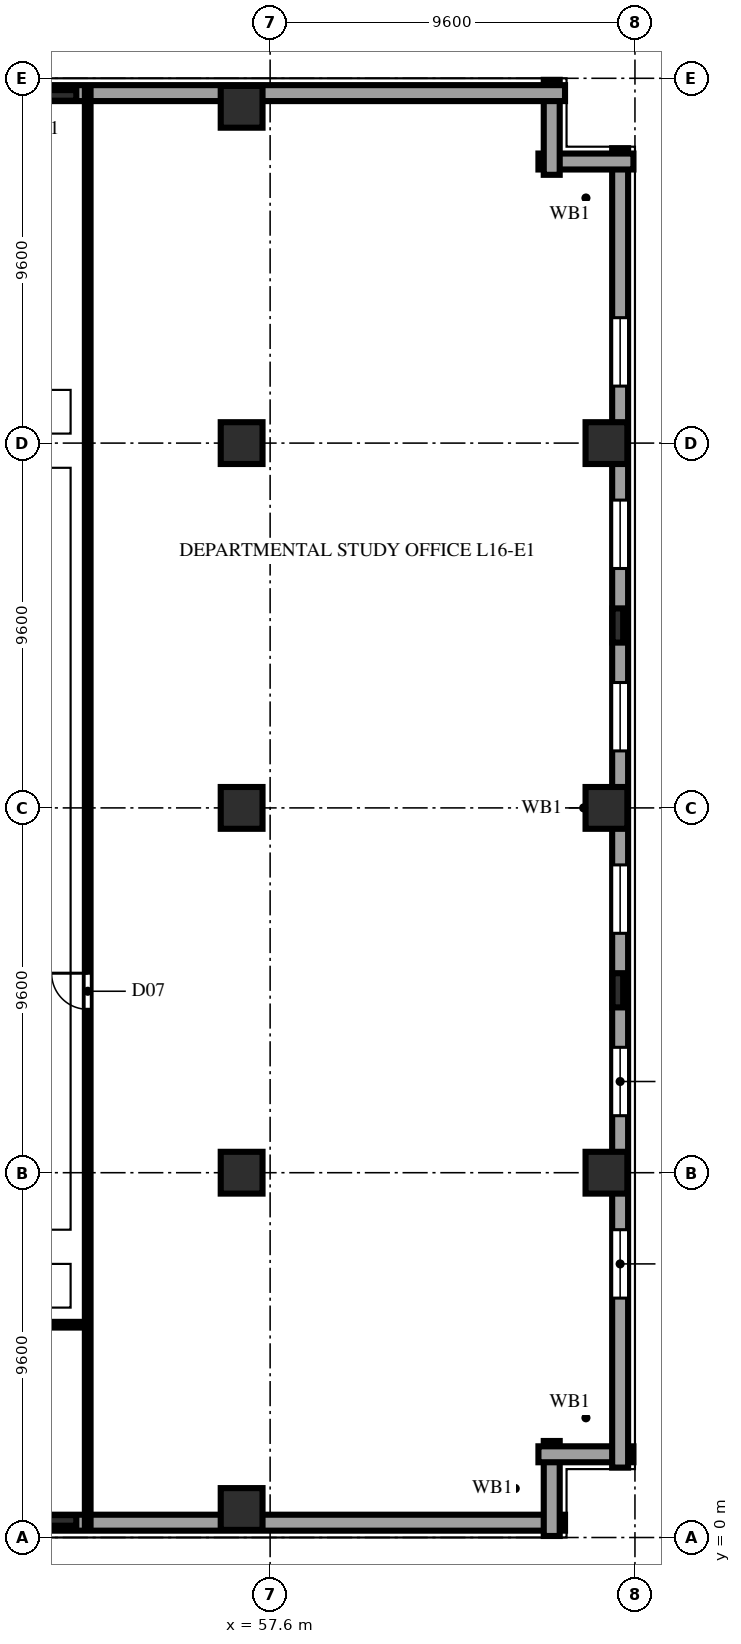
"""IFC4 building model, lengths in metres.
Left out: names, types, materials, properties, quantities, classifications, styles, units other than length and angle.
Written with IfcOpenShell. Run it as: python <this file> out.ifc"""

import sys

from ifc_helpers import new_model, si_unit, direction, frame, frame_2d, origin, origin_2d, place, context, subcontext, project, spatial, rectangle, extrude, element, fill, save


model = new_model("IFC4")
c1 = context("Model", 3, precision=1e-05, world=origin(), true_north=direction((0.0, 1.0)))
c2 = subcontext(c1, "Body", "Model", "MODEL_VIEW")
j1 = project(units=[si_unit("LENGTHUNIT", "METRE"), si_unit("PLANEANGLEUNIT", "RADIAN")], contexts=[c1])
p1 = place(None, origin())
s1 = spatial("IfcSite", under=j1, at=p1, CompositionType="ELEMENT")
p2 = place(p1, origin())
s2 = spatial("IfcBuilding", under=s1, at=p2, CompositionType="ELEMENT")
p3 = place(p2, frame((0.0, 0.0, 66.0)))
s3 = spatial("IfcBuildingStorey", under=s2, at=p3, CompositionType="ELEMENT", Elevation=66.0)
for number, where, z_axis, x_axis in (
    (1, (56.85, 0.75, 0.0), (0.0, 0.0, 1.0), (1.0, 0.0, 0.0)),
    (2, (56.85, 9.6, 0.0), (0.0, 0.0, 1.0), (1.0, 0.0, 0.0)),
    (3, (56.85, 19.2, 0.0), (0.0, 0.0, 1.0), (1.0, 0.0, 0.0)),
    (4, (56.85, 28.8, 0.0), (0.0, 0.0, 1.0), (1.0, 0.0, 0.0)),
    (5, (56.85, 37.65, 0.0), (0.0, 0.0, 1.0), (1.0, 0.0, 0.0)),
    (6, (66.45, 9.6, 0.0), (0.0, 0.0, 1.0), (1.0, 0.0, 0.0)),
    (7, (66.45, 19.2, 0.0), (0.0, 0.0, 1.0), (1.0, 0.0, 0.0)),
    (8, (66.45, 28.8, 0.0), (0.0, 0.0, 1.0), (1.0, 0.0, 0.0)),
):
    element("IfcColumn", number, at=place(p3, frame(where, z_axis=z_axis, x_axis=x_axis)), inside=s3, PredefinedType="COLUMN", context=c2, shape_type="SweptSolid", body=[
        extrude(rectangle(XDim=1.1, YDim=1.1, at=origin_2d()), origin(), (0.0, 0.0, 1.0), 3.8),
    ])
for number, where, z_axis, x_axis in (
    (9, (52.05, 0.45, 0.0), (0.0, 0.0, 1.0), (1.0, 0.0, 0.0)),
    (10, (66.75, 14.4, 0.0), (0.0, 0.0, 1.0), (0.0, 1.0, 0.0)),
    (11, (66.75, 24.0, 0.0), (0.0, 0.0, 1.0), (0.0, 1.0, 0.0)),
    (12, (52.05, 37.95, 0.0), (0.0, 0.0, 1.0), (1.0, 0.0, 0.0)),
):
    element("IfcColumn", number, at=place(p3, frame(where, z_axis=z_axis, x_axis=x_axis)), inside=s3, PredefinedType="PILASTER", context=c2, shape_type="SweptSolid", body=[
        extrude(rectangle(XDim=0.9, YDim=0.28, at=origin_2d()), origin(), (0.0, 0.0, 1.0), 3.8),
    ])
p4 = place(p3, frame((1.84, 0.39, 0.0), z_axis=(0.0, 0.0, 1.0), x_axis=(1.0, 0.0, 0.0)))
e13 = element("IfcWall", 13, at=p4, inside=s3, PredefinedType="SOLIDWALL", context=c2, shape_type="SweptSolid", body=[
    extrude(rectangle(XDim=63.52, YDim=0.42, at=frame_2d((31.76, 0.0))), origin(), (0.0, 0.0, 1.0), 3.54),
])
p5 = place(p4, frame((4.16, 0.0, 0.85)))
e14 = element("IfcOpeningElement", 14, at=p5, cuts=e13, PredefinedType="OPENING", context=c2, shape_type="SweptSolid", body=[
    extrude(rectangle(XDim=2.4, YDim=1.85, at=frame_2d((1.2, 0.925))), frame((0.0, 0.222, 0.0), z_axis=(0.0, -1.0, 0.0), x_axis=(1.0, 0.0, 0.0)), (0.0, 0.0, 1.0), 0.444),
])
p6 = place(p4, frame((8.96, 0.0, 0.85)))
e15 = element("IfcOpeningElement", 15, at=p6, cuts=e13, PredefinedType="OPENING", context=c2, shape_type="SweptSolid", body=[
    extrude(rectangle(XDim=2.4, YDim=1.85, at=frame_2d((1.2, 0.925))), frame((0.0, 0.222, 0.0), z_axis=(0.0, -1.0, 0.0), x_axis=(1.0, 0.0, 0.0)), (0.0, 0.0, 1.0), 0.444),
])
p7 = place(p4, frame((13.76, 0.0, 0.85)))
e16 = element("IfcOpeningElement", 16, at=p7, cuts=e13, PredefinedType="OPENING", context=c2, shape_type="SweptSolid", body=[
    extrude(rectangle(XDim=2.4, YDim=1.85, at=frame_2d((1.2, 0.925))), frame((0.0, 0.222, 0.0), z_axis=(0.0, -1.0, 0.0), x_axis=(1.0, 0.0, 0.0)), (0.0, 0.0, 1.0), 0.444),
])
p8 = place(p4, frame((18.56, 0.0, 0.85)))
e17 = element("IfcOpeningElement", 17, at=p8, cuts=e13, PredefinedType="OPENING", context=c2, shape_type="SweptSolid", body=[
    extrude(rectangle(XDim=2.4, YDim=1.85, at=frame_2d((1.2, 0.925))), frame((0.0, 0.222, 0.0), z_axis=(0.0, -1.0, 0.0), x_axis=(1.0, 0.0, 0.0)), (0.0, 0.0, 1.0), 0.444),
])
p9 = place(p4, frame((23.36, 0.0, 0.85)))
e18 = element("IfcOpeningElement", 18, at=p9, cuts=e13, PredefinedType="OPENING", context=c2, shape_type="SweptSolid", body=[
    extrude(rectangle(XDim=2.4, YDim=1.85, at=frame_2d((1.2, 0.925))), frame((0.0, 0.222, 0.0), z_axis=(0.0, -1.0, 0.0), x_axis=(1.0, 0.0, 0.0)), (0.0, 0.0, 1.0), 0.444),
])
p10 = place(p4, frame((28.16, 0.0, 0.85)))
e19 = element("IfcOpeningElement", 19, at=p10, cuts=e13, PredefinedType="OPENING", context=c2, shape_type="SweptSolid", body=[
    extrude(rectangle(XDim=2.4, YDim=1.85, at=frame_2d((1.2, 0.925))), frame((0.0, 0.222, 0.0), z_axis=(0.0, -1.0, 0.0), x_axis=(1.0, 0.0, 0.0)), (0.0, 0.0, 1.0), 0.444),
])
for number, where, z_axis, x_axis in (
    (20, (65.01, 0.04, 0.0), (0.0, 0.0, 1.0), (0.0, 1.0, 0.0)),
    (21, (64.66, 2.19, 0.0), (0.0, 0.0, 1.0), (1.0, 0.0, 0.0)),
):
    element("IfcWall", number, at=place(p3, frame(where, z_axis=z_axis, x_axis=x_axis)), inside=s3, PredefinedType="SOLIDWALL", context=c2, shape_type="SweptSolid", body=[
        extrude(rectangle(XDim=2.5, YDim=0.42, at=frame_2d((1.25, 0.0))), origin(), (0.0, 0.0, 1.0), 3.54),
    ])
p11 = place(p3, frame((66.81, 1.84, 0.0), z_axis=(0.0, 0.0, 1.0), x_axis=(0.0, 1.0, 0.0)))
e22 = element("IfcWall", 22, at=p11, inside=s3, PredefinedType="SOLIDWALL", context=c2, shape_type="SweptSolid", body=[
    extrude(rectangle(XDim=34.72, YDim=0.42, at=frame_2d((17.36, 0.0))), origin(), (0.0, 0.0, 1.0), 3.54),
])
p12 = place(p11, frame((4.46, 0.0, 0.85)))
e23 = element("IfcOpeningElement", 23, at=p12, cuts=e22, PredefinedType="OPENING", context=c2, shape_type="SweptSolid", body=[
    extrude(rectangle(XDim=1.8, YDim=1.85, at=frame_2d((0.9, 0.925))), frame((0.0, 0.222, 0.0), z_axis=(0.0, -1.0, 0.0), x_axis=(1.0, 0.0, 0.0)), (0.0, 0.0, 1.0), 0.444),
])
p13 = place(p11, frame((9.26, 0.0, 0.85)))
e24 = element("IfcOpeningElement", 24, at=p13, cuts=e22, PredefinedType="OPENING", context=c2, shape_type="SweptSolid", body=[
    extrude(rectangle(XDim=1.8, YDim=1.85, at=frame_2d((0.9, 0.925))), frame((0.0, 0.222, 0.0), z_axis=(0.0, -1.0, 0.0), x_axis=(1.0, 0.0, 0.0)), (0.0, 0.0, 1.0), 0.444),
])
p14 = place(p11, frame((14.06, 0.0, 0.85)))
e25 = element("IfcOpeningElement", 25, at=p14, cuts=e22, PredefinedType="OPENING", context=c2, shape_type="SweptSolid", body=[
    extrude(rectangle(XDim=1.8, YDim=1.85, at=frame_2d((0.9, 0.925))), frame((0.0, 0.222, 0.0), z_axis=(0.0, -1.0, 0.0), x_axis=(1.0, 0.0, 0.0)), (0.0, 0.0, 1.0), 0.444),
])
p15 = place(p11, frame((18.86, 0.0, 0.85)))
e26 = element("IfcOpeningElement", 26, at=p15, cuts=e22, PredefinedType="OPENING", context=c2, shape_type="SweptSolid", body=[
    extrude(rectangle(XDim=1.8, YDim=1.85, at=frame_2d((0.9, 0.925))), frame((0.0, 0.222, 0.0), z_axis=(0.0, -1.0, 0.0), x_axis=(1.0, 0.0, 0.0)), (0.0, 0.0, 1.0), 0.444),
])
p16 = place(p11, frame((23.66, 0.0, 0.85)))
e27 = element("IfcOpeningElement", 27, at=p16, cuts=e22, PredefinedType="OPENING", context=c2, shape_type="SweptSolid", body=[
    extrude(rectangle(XDim=1.8, YDim=1.85, at=frame_2d((0.9, 0.925))), frame((0.0, 0.222, 0.0), z_axis=(0.0, -1.0, 0.0), x_axis=(1.0, 0.0, 0.0)), (0.0, 0.0, 1.0), 0.444),
])
p17 = place(p11, frame((28.46, 0.0, 0.85)))
e28 = element("IfcOpeningElement", 28, at=p17, cuts=e22, PredefinedType="OPENING", context=c2, shape_type="SweptSolid", body=[
    extrude(rectangle(XDim=1.8, YDim=1.85, at=frame_2d((0.9, 0.925))), frame((0.0, 0.222, 0.0), z_axis=(0.0, -1.0, 0.0), x_axis=(1.0, 0.0, 0.0)), (0.0, 0.0, 1.0), 0.444),
])
for number, where, z_axis, x_axis in (
    (29, (67.16, 36.21, 0.0), (0.0, 0.0, 1.0), (-1.0, 0.0, 0.0)),
    (30, (65.01, 35.86, 0.0), (0.0, 0.0, 1.0), (0.0, 1.0, 0.0)),
):
    element("IfcWall", number, at=place(p3, frame(where, z_axis=z_axis, x_axis=x_axis)), inside=s3, PredefinedType="SOLIDWALL", context=c2, shape_type="SweptSolid", body=[
        extrude(rectangle(XDim=2.5, YDim=0.42, at=frame_2d((1.25, 0.0))), origin(), (0.0, 0.0, 1.0), 3.54),
    ])
p18 = place(p3, frame((65.36, 38.01, 0.0), z_axis=(0.0, 0.0, 1.0), x_axis=(-1.0, 0.0, 0.0)))
e31 = element("IfcWall", 31, at=p18, inside=s3, PredefinedType="SOLIDWALL", context=c2, shape_type="SweptSolid", body=[
    extrude(rectangle(XDim=27.7, YDim=0.42, at=frame_2d((13.85, 0.0))), origin(), (0.0, 0.0, 1.0), 3.54),
])
p19 = place(p3, frame((0.22, 5.6, 0.0), z_axis=(0.0, 0.0, 1.0), x_axis=(1.0, 0.0, 0.0)))
e32 = element("IfcWall", 32, at=p19, inside=s3, PredefinedType="PARTITIONING", context=c2, shape_type="SweptSolid", body=[
    extrude(rectangle(XDim=52.58, YDim=0.15, at=frame_2d((26.29, 0.0))), origin(), (0.0, 0.0, 1.0), 3.54),
])
p20 = place(p19, frame((13.68, 0.0, 0.0)))
e33 = element("IfcOpeningElement", 33, at=p20, cuts=e32, PredefinedType="OPENING", context=c2, shape_type="SweptSolid", body=[
    extrude(rectangle(XDim=1.2, YDim=2.2, at=frame_2d((0.6, 1.1))), frame((0.0, 0.087, 0.0), z_axis=(0.0, -1.0, 0.0), x_axis=(1.0, 0.0, 0.0)), (0.0, 0.0, 1.0), 0.174),
])
p21 = place(p19, frame((32.33, 0.0, 0.0)))
e34 = element("IfcOpeningElement", 34, at=p21, cuts=e32, PredefinedType="OPENING", context=c2, shape_type="SweptSolid", body=[
    extrude(rectangle(XDim=1.2, YDim=2.2, at=frame_2d((0.6, 1.1))), frame((0.0, 0.087, 0.0), z_axis=(0.0, -1.0, 0.0), x_axis=(1.0, 0.0, 0.0)), (0.0, 0.0, 1.0), 0.174),
])
p22 = place(p19, frame((41.73, 0.0, 0.0)))
e35 = element("IfcOpeningElement", 35, at=p22, cuts=e32, PredefinedType="OPENING", context=c2, shape_type="SweptSolid", body=[
    extrude(rectangle(XDim=1.2, YDim=2.2, at=frame_2d((0.6, 1.1))), frame((0.0, 0.087, 0.0), z_axis=(0.0, -1.0, 0.0), x_axis=(1.0, 0.0, 0.0)), (0.0, 0.0, 1.0), 0.174),
])
p23 = place(p3, frame((52.8, 0.22, 0.0), z_axis=(0.0, 0.0, 1.0), x_axis=(0.0, 1.0, 0.0)))
e36 = element("IfcWall", 36, at=p23, inside=s3, PredefinedType="PARTITIONING", context=c2, shape_type="SweptSolid", body=[
    extrude(rectangle(XDim=37.96, YDim=0.15, at=frame_2d((18.98, 0.0))), origin(), (0.0, 0.0, 1.0), 3.54),
])
p24 = place(p23, frame((13.68, 0.0, 0.0)))
e37 = element("IfcOpeningElement", 37, at=p24, cuts=e36, PredefinedType="OPENING", context=c2, shape_type="SweptSolid", body=[
    extrude(rectangle(XDim=0.95, YDim=2.15, at=frame_2d((0.475, 1.075))), frame((0.0, 0.087, 0.0), z_axis=(0.0, -1.0, 0.0), x_axis=(1.0, 0.0, 0.0)), (0.0, 0.0, 1.0), 0.174),
])
p25 = place(p12, origin())
e38 = element("IfcWindow", 38, at=p25, inside=s3, PartitioningType="DOUBLE_PANEL_VERTICAL", PredefinedType="WINDOW", context=c2, shape_type="SweptSolid", body=[
    extrude(rectangle(XDim=1.8, YDim=1.85, at=frame_2d((0.9, 0.925))), frame((0.0, 0.11, 0.0), z_axis=(0.0, -1.0, 0.0), x_axis=(1.0, 0.0, 0.0)), (0.0, 0.0, 1.0), 0.06),
])
fill(e23, e38)
p26 = place(p13, origin())
e39 = element("IfcWindow", 39, at=p26, inside=s3, PartitioningType="DOUBLE_PANEL_VERTICAL", PredefinedType="WINDOW", context=c2, shape_type="SweptSolid", body=[
    extrude(rectangle(XDim=1.8, YDim=1.85, at=frame_2d((0.9, 0.925))), frame((0.0, 0.11, 0.0), z_axis=(0.0, -1.0, 0.0), x_axis=(1.0, 0.0, 0.0)), (0.0, 0.0, 1.0), 0.06),
])
fill(e24, e39)
p27 = place(p14, origin())
e40 = element("IfcWindow", 40, at=p27, inside=s3, PartitioningType="DOUBLE_PANEL_VERTICAL", PredefinedType="WINDOW", context=c2, shape_type="SweptSolid", body=[
    extrude(rectangle(XDim=1.8, YDim=1.85, at=frame_2d((0.9, 0.925))), frame((0.0, 0.11, 0.0), z_axis=(0.0, -1.0, 0.0), x_axis=(1.0, 0.0, 0.0)), (0.0, 0.0, 1.0), 0.06),
])
fill(e25, e40)
p28 = place(p15, origin())
e41 = element("IfcWindow", 41, at=p28, inside=s3, PartitioningType="DOUBLE_PANEL_VERTICAL", PredefinedType="WINDOW", context=c2, shape_type="SweptSolid", body=[
    extrude(rectangle(XDim=1.8, YDim=1.85, at=frame_2d((0.9, 0.925))), frame((0.0, 0.11, 0.0), z_axis=(0.0, -1.0, 0.0), x_axis=(1.0, 0.0, 0.0)), (0.0, 0.0, 1.0), 0.06),
])
fill(e26, e41)
p29 = place(p16, origin())
e42 = element("IfcWindow", 42, at=p29, inside=s3, PartitioningType="DOUBLE_PANEL_VERTICAL", PredefinedType="WINDOW", context=c2, shape_type="SweptSolid", body=[
    extrude(rectangle(XDim=1.8, YDim=1.85, at=frame_2d((0.9, 0.925))), frame((0.0, 0.11, 0.0), z_axis=(0.0, -1.0, 0.0), x_axis=(1.0, 0.0, 0.0)), (0.0, 0.0, 1.0), 0.06),
])
fill(e27, e42)
p30 = place(p17, origin())
e43 = element("IfcWindow", 43, at=p30, inside=s3, PartitioningType="DOUBLE_PANEL_VERTICAL", PredefinedType="WINDOW", context=c2, shape_type="SweptSolid", body=[
    extrude(rectangle(XDim=1.8, YDim=1.85, at=frame_2d((0.9, 0.925))), frame((0.0, 0.11, 0.0), z_axis=(0.0, -1.0, 0.0), x_axis=(1.0, 0.0, 0.0)), (0.0, 0.0, 1.0), 0.06),
])
fill(e28, e43)
p31 = place(p24, origin())
e44 = element("IfcDoor", 44, at=p31, inside=s3, OperationType="SINGLE_SWING_RIGHT", PredefinedType="DOOR", context=c2, shape_type="SweptSolid", body=[
    extrude(rectangle(XDim=0.95, YDim=2.15, at=frame_2d((0.475, 1.075))), frame((0.0, 0.025, 0.0), z_axis=(0.0, -1.0, 0.0), x_axis=(1.0, 0.0, 0.0)), (0.0, 0.0, 1.0), 0.05),
])
fill(e37, e44)
save(model, sys.argv[1])
